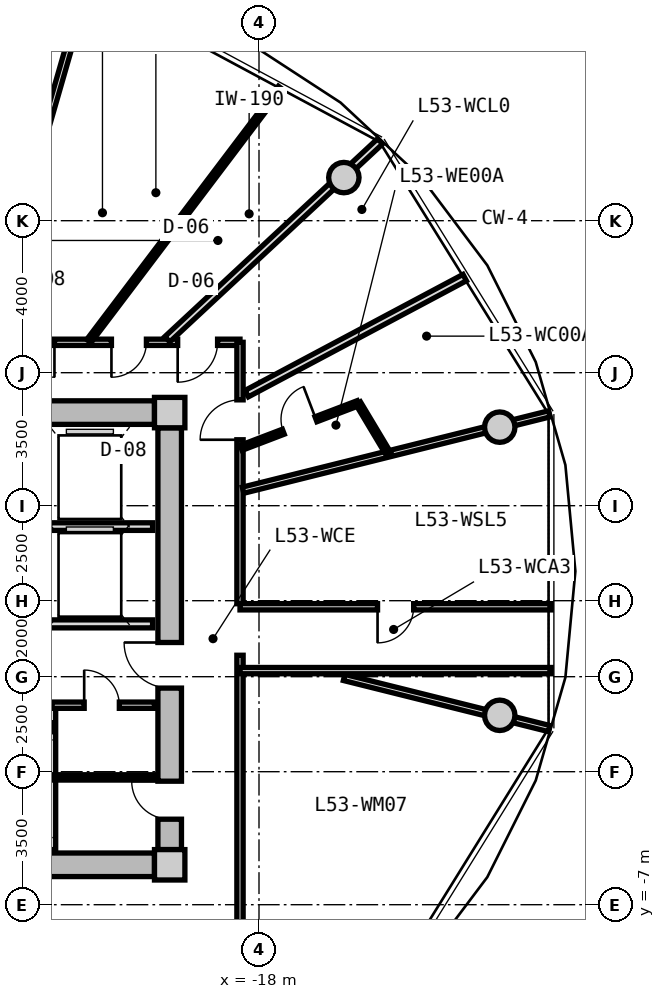
"""IFC4 building model, lengths in metres.
Left out: names, types, materials, properties, quantities, classifications, styles, units other than length and angle.
Written with IfcOpenShell. Run it as: python <this file> out.ifc"""

import sys

from ifc_helpers import new_model, si_unit, direction, frame, frame_2d, origin, origin_2d, place, context, subcontext, project, spatial, rectangle, circle, extrude, source, transform, mapped, element, fill, save


model = new_model("IFC4")
c1 = context("Model", 3, precision=1e-05, world=origin(), true_north=direction((0.0, 1.0)))
c2 = subcontext(c1, "Body", "Model", "MODEL_VIEW")
j1 = project(units=[si_unit("LENGTHUNIT", "METRE"), si_unit("PLANEANGLEUNIT", "RADIAN")], contexts=[c1])
p1 = place(None, origin())
s1 = spatial("IfcSite", under=j1, at=p1, CompositionType="ELEMENT")
p2 = place(p1, origin())
s2 = spatial("IfcBuilding", under=s1, at=p2, CompositionType="ELEMENT")
p3 = place(p2, frame((0.0, 0.0, 170.9)))
s3 = spatial("IfcBuildingStorey", under=s2, at=p3, CompositionType="ELEMENT", Elevation=170.9)
m1 = source(origin(), c2, "Body", "SweptSolid", [
    extrude(rectangle(XDim=0.8, YDim=0.8, at=origin_2d()), origin(), (0.0, 0.0, 1.0), 3.05),
])
for number, where, z_axis, x_axis in (
    (1, (-20.35, -5.95, 0.0), (0.0, 0.0, 1.0), (1.0, 0.0, 0.0)),
    (2, (-20.35, 5.95, 0.0), (0.0, 0.0, 1.0), (1.0, 0.0, 0.0)),
):
    element("IfcColumn", number, at=place(p3, frame(where, z_axis=z_axis, x_axis=x_axis)), inside=s3, PredefinedType="COLUMN", context=c2, shape_type="MappedRepresentation", body=[
        mapped(m1, transform((0.0, 0.0, 0.0), x_axis=(1.0, 0.0, 0.0), y_axis=(0.0, 1.0, 0.0), z_axis=(0.0, 0.0, 1.0), scale=1.0)),
    ])
m2 = source(origin(), c2, "Body", "SweptSolid", [
    extrude(rectangle(XDim=14.5, YDim=0.62, at=frame_2d((7.25, 0.0))), origin(), (0.0, 0.0, 1.0), 2.81),
])
for number, where, z_axis, x_axis in (
    (3, (-35.25, 5.95, 0.0), (0.0, 0.0, 1.0), (1.0, 0.0, 0.0)),
    (4, (-20.75, -5.95, 0.0), (0.0, 0.0, 1.0), (-1.0, 0.0, 0.0)),
):
    element("IfcWall", number, at=place(p3, frame(where, z_axis=z_axis, x_axis=x_axis)), inside=s3, PredefinedType="SHEAR", context=c2, shape_type="MappedRepresentation", body=[
        mapped(m2, transform((0.0, 0.0, 0.0), x_axis=(1.0, 0.0, 0.0), y_axis=(0.0, 1.0, 0.0), z_axis=(0.0, 0.0, 1.0), scale=1.0)),
    ])
m3 = source(origin(), c2, "Body", "SweptSolid", [
    extrude(rectangle(XDim=11.1, YDim=0.62, at=frame_2d((5.55, 0.0))), origin(), (0.0, 0.0, 1.0), 2.81),
])
p4 = place(p3, frame((-20.35, 5.55, 0.0), z_axis=(0.0, 0.0, 1.0), x_axis=(0.0, -1.0, 0.0)))
e5 = element("IfcWall", 5, at=p4, inside=s3, PredefinedType="SHEAR", context=c2, shape_type="MappedRepresentation", body=[
    mapped(m3, transform((0.0, 0.0, 0.0), x_axis=(1.0, 0.0, 0.0), y_axis=(0.0, 1.0, 0.0), z_axis=(0.0, 0.0, 1.0), scale=1.0)),
])
p5 = place(p4, frame((5.65, 0.0, 0.0)))
e6 = element("IfcOpeningElement", 6, at=p5, cuts=e5, PredefinedType="OPENING", context=c2, shape_type="SweptSolid", body=[
    extrude(rectangle(XDim=1.2, YDim=2.15, at=frame_2d((0.6, 1.075))), frame((0.0, 0.32, 0.0), z_axis=(0.0, -1.0, 0.0), x_axis=(1.0, 0.0, 0.0)), (0.0, 0.0, 1.0), 0.64),
])
p6 = place(p4, frame((9.3, 0.0, 0.0)))
e7 = element("IfcOpeningElement", 7, at=p6, cuts=e5, PredefinedType="OPENING", context=c2, shape_type="SweptSolid", body=[
    extrude(rectangle(XDim=1.0, YDim=2.1, at=frame_2d((0.5, 1.05))), frame((0.0, 0.32, 0.0), z_axis=(0.0, -1.0, 0.0), x_axis=(1.0, 0.0, 0.0)), (0.0, 0.0, 1.0), 0.64),
])
m4 = source(origin(), c2, "Body", "SweptSolid", [
    extrude(circle(Radius=0.4, at=origin_2d()), origin(), (0.0, 0.0, 1.0), 3.05),
])
for number, where, z_axis, x_axis in (
    (8, (-11.665, 5.567, 0.0), (0.0, 0.0, 1.0), (1.0, 0.0, 0.0)),
    (9, (-15.767, 12.135, 0.0), (0.0, 0.0, 1.0), (1.0, 0.0, 0.0)),
    (10, (-11.665, -2.016, 0.0), (0.0, 0.0, 1.0), (1.0, 0.0, 0.0)),
):
    element("IfcColumn", number, at=place(p3, frame(where, z_axis=z_axis, x_axis=x_axis)), inside=s3, PredefinedType="COLUMN", context=c2, shape_type="MappedRepresentation", body=[
        mapped(m4, transform((0.0, 0.0, 0.0), x_axis=(1.0, 0.0, 0.0), y_axis=(0.0, 1.0, 0.0), z_axis=(0.0, 0.0, 1.0), scale=1.0)),
    ])
m5 = source(origin(), c2, "Body", "SweptSolid", [
    extrude(rectangle(XDim=3.2, YDim=0.2, at=frame_2d((1.6, 0.0))), origin(), (0.0, 0.0, 1.0), 2.795),
])
p7 = place(p3, frame((-24.0, 2.95, 0.0), z_axis=(0.0, 0.0, 1.0), x_axis=(1.0, 0.0, 0.0)))
e11 = element("IfcWall", 11, at=p7, inside=s3, PredefinedType="PARTITIONING", context=c2, shape_type="MappedRepresentation", body=[
    mapped(m5, transform((0.0, 0.0, 0.0), x_axis=(1.0, 0.0, 0.0), y_axis=(0.0, 1.0, 0.0), z_axis=(0.0, 0.0, 1.0), scale=1.0)),
])
m6 = source(origin(), c2, "Body", "SweptSolid", [
    extrude(rectangle(XDim=6.66, YDim=0.21, at=frame_2d((3.33, 0.0))), origin(), (0.0, 0.0, 1.0), 2.795),
])
p8 = place(p3, frame((-27.46, 0.39, 0.0), z_axis=(0.0, 0.0, 1.0), x_axis=(1.0, 0.0, 0.0)))
e12 = element("IfcWall", 12, at=p8, inside=s3, PredefinedType="PARTITIONING", context=c2, shape_type="MappedRepresentation", body=[
    mapped(m6, transform((0.0, 0.0, 0.0), x_axis=(1.0, 0.0, 0.0), y_axis=(0.0, 1.0, 0.0), z_axis=(0.0, 0.0, 1.0), scale=1.0)),
])
p9 = place(p8, frame((1.0, 0.0, 0.0)))
e13 = element("IfcOpeningElement", 13, at=p9, cuts=e12, PredefinedType="OPENING", context=c2, shape_type="SweptSolid", body=[
    extrude(rectangle(XDim=1.2, YDim=2.15, at=frame_2d((0.6, 1.075))), frame((0.0, 0.115, 0.0), z_axis=(0.0, -1.0, 0.0), x_axis=(1.0, 0.0, 0.0)), (0.0, 0.0, 1.0), 0.23),
])
m7 = source(origin(), c2, "Body", "SweptSolid", [
    extrude(rectangle(XDim=3.8, YDim=0.2, at=frame_2d((1.9, 0.0))), origin(), (0.0, 0.0, 1.0), 2.795),
])
p10 = place(p3, frame((-23.45, -5.55, 0.0), z_axis=(0.0, 0.0, 1.0), x_axis=(0.0, 1.0, 0.0)))
e14 = element("IfcWall", 14, at=p10, inside=s3, PredefinedType="PARTITIONING", context=c2, shape_type="MappedRepresentation", body=[
    mapped(m7, transform((0.0, 0.0, 0.0), x_axis=(1.0, 0.0, 0.0), y_axis=(0.0, 1.0, 0.0), z_axis=(0.0, 0.0, 1.0), scale=1.0)),
])
m8 = source(origin(), c2, "Body", "SweptSolid", [
    extrude(rectangle(XDim=2.7, YDim=0.165, at=frame_2d((1.35, 0.0))), origin(), (0.0, 0.0, 1.0), 2.795),
])
p11 = place(p3, frame((-23.45, -1.75, 0.0), z_axis=(0.0, 0.0, 1.0), x_axis=(1.0, 0.0, 0.0)))
e15 = element("IfcWall", 15, at=p11, inside=s3, PredefinedType="PARTITIONING", context=c2, shape_type="MappedRepresentation", body=[
    mapped(m8, transform((0.0, 0.0, 0.0), x_axis=(1.0, 0.0, 0.0), y_axis=(0.0, 1.0, 0.0), z_axis=(0.0, 0.0, 1.0), scale=1.0)),
])
p12 = place(p11, frame((0.85, 0.0, 0.0)))
e16 = element("IfcOpeningElement", 16, at=p12, cuts=e15, PredefinedType="OPENING", context=c2, shape_type="SweptSolid", body=[
    extrude(rectangle(XDim=0.925, YDim=2.1, at=frame_2d((0.462, 1.05))), frame((0.0, 0.093, 0.0), z_axis=(0.0, -1.0, 0.0), x_axis=(1.0, 0.0, 0.0)), (0.0, 0.0, 1.0), 0.185),
])
m9 = source(origin(), c2, "Body", "SweptSolid", [
    extrude(rectangle(XDim=2.7, YDim=0.14, at=frame_2d((1.35, 0.0))), origin(), (0.0, 0.0, 1.0), 2.795),
])
p13 = place(p3, frame((-23.45, -3.65, 0.0), z_axis=(0.0, 0.0, 1.0), x_axis=(1.0, 0.0, 0.0)))
e17 = element("IfcWall", 17, at=p13, inside=s3, PredefinedType="PARTITIONING", context=c2, shape_type="MappedRepresentation", body=[
    mapped(m9, transform((0.0, 0.0, 0.0), x_axis=(1.0, 0.0, 0.0), y_axis=(0.0, 1.0, 0.0), z_axis=(0.0, 0.0, 1.0), scale=1.0)),
])
m10 = source(origin(), c2, "Body", "SweptSolid", [
    extrude(rectangle(XDim=8.58, YDim=0.165, at=frame_2d((4.29, 0.0))), origin(), (0.0, 0.0, 1.0), 2.795),
])
p14 = place(p3, frame((-27.08, 7.8, 0.0), z_axis=(0.0, 0.0, 1.0), x_axis=(1.0, 0.0, 0.0)))
e18 = element("IfcWall", 18, at=p14, inside=s3, PredefinedType="PARTITIONING", context=c2, shape_type="MappedRepresentation", body=[
    mapped(m10, transform((0.0, 0.0, 0.0), x_axis=(1.0, 0.0, 0.0), y_axis=(0.0, 1.0, 0.0), z_axis=(0.0, 0.0, 1.0), scale=1.0)),
])
p15 = place(p14, frame((6.94, 0.0, 0.0)))
e19 = element("IfcOpeningElement", 19, at=p15, cuts=e18, PredefinedType="OPENING", context=c2, shape_type="SweptSolid", body=[
    extrude(rectangle(XDim=1.05, YDim=2.15, at=frame_2d((0.525, 1.075))), frame((0.0, 0.093, 0.0), z_axis=(0.0, -1.0, 0.0), x_axis=(1.0, 0.0, 0.0)), (0.0, 0.0, 1.0), 0.185),
])
p16 = place(p14, frame((5.197, 0.0, 0.0)))
e20 = element("IfcOpeningElement", 20, at=p16, cuts=e18, PredefinedType="OPENING", context=c2, shape_type="SweptSolid", body=[
    extrude(rectangle(XDim=0.92, YDim=2.1, at=frame_2d((0.46, 1.05))), frame((0.0, 0.093, 0.0), z_axis=(0.0, -1.0, 0.0), x_axis=(1.0, 0.0, 0.0)), (0.0, 0.0, 1.0), 0.185),
])
p17 = place(p14, frame((2.778, 0.0, 0.0)))
e21 = element("IfcOpeningElement", 21, at=p17, cuts=e18, PredefinedType="OPENING", context=c2, shape_type="SweptSolid", body=[
    extrude(rectangle(XDim=0.92, YDim=2.1, at=frame_2d((0.46, 1.05))), frame((0.0, 0.093, 0.0), z_axis=(0.0, -1.0, 0.0), x_axis=(1.0, 0.0, 0.0)), (0.0, 0.0, 1.0), 0.185),
])
m11 = source(origin(), c2, "Body", "SweptSolid", [
    extrude(rectangle(XDim=6.88, YDim=0.165, at=frame_2d((3.44, 0.0))), origin(), (0.0, 0.0, 1.0), 2.795),
])
p18 = place(p3, frame((-18.5, 7.8, 0.0), z_axis=(0.0, 0.0, 1.0), x_axis=(0.0, -1.0, 0.0)))
e22 = element("IfcWall", 22, at=p18, inside=s3, PredefinedType="PARTITIONING", context=c2, shape_type="MappedRepresentation", body=[
    mapped(m11, transform((0.0, 0.0, 0.0), x_axis=(1.0, 0.0, 0.0), y_axis=(0.0, 1.0, 0.0), z_axis=(0.0, 0.0, 1.0), scale=1.0)),
])
p19 = place(p18, frame((1.515, 0.0, 0.0)))
e23 = element("IfcOpeningElement", 23, at=p19, cuts=e22, PredefinedType="OPENING", context=c2, shape_type="SweptSolid", body=[
    extrude(rectangle(XDim=1.05, YDim=2.15, at=frame_2d((0.525, 1.075))), frame((0.0, 0.093, 0.0), z_axis=(0.0, -1.0, 0.0), x_axis=(1.0, 0.0, 0.0)), (0.0, 0.0, 1.0), 0.185),
])
m12 = source(origin(), c2, "Body", "SweptSolid", [
    extrude(rectangle(XDim=7.365, YDim=0.165, at=frame_2d((3.682, 0.0))), origin(), (0.0, 0.0, 1.0), 2.795),
])
p20 = place(p3, frame((-18.5, -0.436, 0.0), z_axis=(0.0, 0.0, 1.0), x_axis=(0.0, -1.0, 0.0)))
e24 = element("IfcWall", 24, at=p20, inside=s3, PredefinedType="PARTITIONING", context=c2, shape_type="MappedRepresentation", body=[
    mapped(m12, transform((0.0, 0.0, 0.0), x_axis=(1.0, 0.0, 0.0), y_axis=(0.0, 1.0, 0.0), z_axis=(0.0, 0.0, 1.0), scale=1.0)),
])
m13 = source(origin(), c2, "Body", "SweptSolid", [
    extrude(rectangle(XDim=9.73, YDim=0.165, at=frame_2d((4.865, 0.0))), origin(), (0.0, 0.0, 1.0), 2.345),
])
p21 = place(p3, frame((-25.217, 7.88, 0.0), z_axis=(0.0, 0.0, 1.0), x_axis=(0.27679492614, 0.960929013436, 0.0)))
e25 = element("IfcWall", 25, at=p21, inside=s3, PredefinedType="PARTITIONING", context=c2, shape_type="MappedRepresentation", body=[
    mapped(m13, transform((0.0, 0.0, 0.0), x_axis=(1.0, 0.0, 0.0), y_axis=(0.0, 1.0, 0.0), z_axis=(0.0, 0.0, 1.0), scale=1.0)),
])
m14 = source(origin(), c2, "Body", "SweptSolid", [
    extrude(rectangle(XDim=5.564, YDim=0.165, at=frame_2d((2.782, 0.0))), origin(), (0.0, 0.0, 1.0), 2.345),
])
p22 = place(p3, frame((-15.76, -1.02, 0.0), z_axis=(0.0, 0.0, 1.0), x_axis=(0.970315176167, -0.241843872984, 0.0)))
e26 = element("IfcWall", 26, at=p22, inside=s3, PredefinedType="PARTITIONING", context=c2, shape_type="MappedRepresentation", body=[
    mapped(m14, transform((0.0, 0.0, 0.0), x_axis=(1.0, 0.0, 0.0), y_axis=(0.0, 1.0, 0.0), z_axis=(0.0, 0.0, 1.0), scale=1.0)),
])
m15 = source(origin(), c2, "Body", "SweptSolid", [
    extrude(rectangle(XDim=8.305, YDim=0.165, at=frame_2d((4.153, 0.0))), origin(), (0.0, 0.0, 1.0), 2.345),
])
p23 = place(p3, frame((-18.42, 3.908, 0.0), z_axis=(0.0, 0.0, 1.0), x_axis=(0.970309994378, 0.241864662175, 0.0)))
e27 = element("IfcWall", 27, at=p23, inside=s3, PredefinedType="PARTITIONING", context=c2, shape_type="MappedRepresentation", body=[
    mapped(m15, transform((0.0, 0.0, 0.0), x_axis=(1.0, 0.0, 0.0), y_axis=(0.0, 1.0, 0.0), z_axis=(0.0, 0.0, 1.0), scale=1.0)),
])
m16 = source(origin(), c2, "Body", "SweptSolid", [
    extrude(rectangle(XDim=8.189, YDim=0.165, at=frame_2d((4.094, 0.0))), origin(), (0.0, 0.0, 1.0), 2.795),
])
p24 = place(p3, frame((-18.5, 0.84, 0.0), z_axis=(0.0, 0.0, 1.0), x_axis=(1.0, 0.0, 0.0)))
e28 = element("IfcWall", 28, at=p24, inside=s3, PredefinedType="PARTITIONING", context=c2, shape_type="MappedRepresentation", body=[
    mapped(m16, transform((0.0, 0.0, 0.0), x_axis=(1.0, 0.0, 0.0), y_axis=(0.0, 1.0, 0.0), z_axis=(0.0, 0.0, 1.0), scale=1.0)),
])
p25 = place(p24, frame((3.619, 0.0, 0.0)))
e29 = element("IfcOpeningElement", 29, at=p25, cuts=e28, PredefinedType="OPENING", context=c2, shape_type="SweptSolid", body=[
    extrude(rectangle(XDim=0.95, YDim=2.1, at=frame_2d((0.475, 1.05))), frame((0.0, 0.093, 0.0), z_axis=(0.0, -1.0, 0.0), x_axis=(1.0, 0.0, 0.0)), (0.0, 0.0, 1.0), 0.185),
])
p26 = place(p3, frame((-10.311, -0.84, 0.0), z_axis=(0.0, 0.0, 1.0), x_axis=(-1.0, 0.0, 0.0)))
e30 = element("IfcWall", 30, at=p26, inside=s3, PredefinedType="PARTITIONING", context=c2, shape_type="MappedRepresentation", body=[
    mapped(m16, transform((0.0, 0.0, 0.0), x_axis=(1.0, 0.0, 0.0), y_axis=(0.0, 1.0, 0.0), z_axis=(0.0, 0.0, 1.0), scale=1.0)),
])
m17 = source(origin(), c2, "Body", "SweptSolid", [
    extrude(rectangle(XDim=7.648, YDim=0.19, at=frame_2d((3.824, 0.0))), origin(), (0.0, 0.0, 1.0), 2.345),
])
p27 = place(p3, frame((-20.413, 7.88, 0.0), z_axis=(0.0, 0.0, 1.0), x_axis=(0.732182665826, 0.681108320213, 0.0)))
e31 = element("IfcWall", 31, at=p27, inside=s3, PredefinedType="PARTITIONING", context=c2, shape_type="MappedRepresentation", body=[
    mapped(m17, transform((0.0, 0.0, 0.0), x_axis=(1.0, 0.0, 0.0), y_axis=(0.0, 1.0, 0.0), z_axis=(0.0, 0.0, 1.0), scale=1.0)),
])
m18 = source(origin(), c2, "Body", "SweptSolid", [
    extrude(rectangle(XDim=6.499, YDim=0.19, at=frame_2d((3.25, 0.0))), origin(), (0.0, 0.0, 1.0), 2.795),
])
p28 = place(p3, frame((-18.324, 6.449, 0.0), z_axis=(0.0, 0.0, 1.0), x_axis=(0.882715595921, 0.469907625729, 0.0)))
e32 = element("IfcWall", 32, at=p28, inside=s3, PredefinedType="PARTITIONING", context=c2, shape_type="MappedRepresentation", body=[
    mapped(m18, transform((0.0, 0.0, 0.0), x_axis=(1.0, 0.0, 0.0), y_axis=(0.0, 1.0, 0.0), z_axis=(0.0, 0.0, 1.0), scale=1.0)),
])
m19 = source(origin(), c2, "Body", "SweptSolid", [
    extrude(rectangle(XDim=3.295, YDim=0.14, at=frame_2d((1.647, 0.0))), origin(), (0.0, 0.0, 1.0), 2.795),
])
p29 = place(p3, frame((-18.47, 5.023, 0.0), z_axis=(0.0, 0.0, 1.0), x_axis=(0.934202224769, 0.356743890258, 0.0)))
e33 = element("IfcWall", 33, at=p29, inside=s3, PredefinedType="PARTITIONING", context=c2, shape_type="MappedRepresentation", body=[
    mapped(m19, transform((0.0, 0.0, 0.0), x_axis=(1.0, 0.0, 0.0), y_axis=(0.0, 1.0, 0.0), z_axis=(0.0, 0.0, 1.0), scale=1.0)),
])
p30 = place(p29, frame((1.188, 0.0, 0.0)))
e34 = element("IfcOpeningElement", 34, at=p30, cuts=e33, PredefinedType="OPENING", context=c2, shape_type="SweptSolid", body=[
    extrude(rectangle(XDim=0.92, YDim=2.1, at=frame_2d((0.46, 1.05))), frame((0.0, 0.08, 0.0), z_axis=(0.0, -1.0, 0.0), x_axis=(1.0, 0.0, 0.0)), (0.0, 0.0, 1.0), 0.16),
])
m20 = source(origin(), c2, "Body", "SweptSolid", [
    extrude(rectangle(XDim=1.558, YDim=0.14, at=frame_2d((0.779, 0.0))), origin(), (0.0, 0.0, 1.0), 2.795),
])
p31 = place(p3, frame((-15.392, 6.198, 0.0), z_axis=(0.0, 0.0, 1.0), x_axis=(0.513735221728, -0.85794878749, 0.0)))
e35 = element("IfcWall", 35, at=p31, inside=s3, PredefinedType="PARTITIONING", context=c2, shape_type="MappedRepresentation", body=[
    mapped(m20, transform((0.0, 0.0, 0.0), x_axis=(1.0, 0.0, 0.0), y_axis=(0.0, 1.0, 0.0), z_axis=(0.0, 0.0, 1.0), scale=1.0)),
])
m21 = source(origin(), c2, "Body", "SweptSolid", [
    extrude(rectangle(XDim=8.359, YDim=0.14, at=frame_2d((4.18, 0.0))), origin(), (0.0, 0.0, 1.0), 2.795),
])
p32 = place(p3, frame((-22.477, 7.83, 0.0), z_axis=(0.0, 0.0, 1.0), x_axis=(0.603265985309, 0.797540062297, 0.0)))
e36 = element("IfcWall", 36, at=p32, inside=s3, PredefinedType="PARTITIONING", context=c2, shape_type="MappedRepresentation", body=[
    mapped(m21, transform((0.0, 0.0, 0.0), x_axis=(1.0, 0.0, 0.0), y_axis=(0.0, 1.0, 0.0), z_axis=(0.0, 0.0, 1.0), scale=1.0)),
])
m22 = source(origin(), c2, "Body", "SweptSolid", [
    extrude(rectangle(XDim=1.2, YDim=2.15, at=frame_2d((0.6, 1.075))), frame((0.0, 0.025, 0.0), z_axis=(0.0, -1.0, 0.0), x_axis=(1.0, 0.0, 0.0)), (0.0, 0.0, 1.0), 0.05),
])
p33 = place(p5, frame((1.2, 0.0, 0.0), z_axis=(0.0, 0.0, 1.0), x_axis=(-1.0, 0.0, 0.0)))
e37 = element("IfcDoor", 37, at=p33, inside=s3, OperationType="SINGLE_SWING_RIGHT", PredefinedType="DOOR", context=c2, shape_type="MappedRepresentation", body=[
    mapped(m22, transform((0.0, 0.0, 0.0), x_axis=(1.0, 0.0, 0.0), y_axis=(0.0, 1.0, 0.0), z_axis=(0.0, 0.0, 1.0), scale=1.0)),
])
fill(e6, e37)
m23 = source(origin(), c2, "Body", "SweptSolid", [
    extrude(rectangle(XDim=0.925, YDim=2.1, at=frame_2d((0.462, 1.05))), frame((0.0, 0.025, 0.0), z_axis=(0.0, -1.0, 0.0), x_axis=(1.0, 0.0, 0.0)), (0.0, 0.0, 1.0), 0.05),
])
p34 = place(p12, origin())
e38 = element("IfcDoor", 38, at=p34, inside=s3, OperationType="SINGLE_SWING_LEFT", PredefinedType="DOOR", context=c2, shape_type="MappedRepresentation", body=[
    mapped(m23, transform((0.0, 0.0, 0.0), x_axis=(1.0, 0.0, 0.0), y_axis=(0.0, 1.0, 0.0), z_axis=(0.0, 0.0, 1.0), scale=1.0)),
])
fill(e16, e38)
m24 = source(origin(), c2, "Body", "SweptSolid", [
    extrude(rectangle(XDim=1.0, YDim=2.1, at=frame_2d((0.5, 1.05))), frame((0.0, 0.025, 0.0), z_axis=(0.0, -1.0, 0.0), x_axis=(1.0, 0.0, 0.0)), (0.0, 0.0, 1.0), 0.05),
])
p35 = place(p6, frame((1.0, 0.0, 0.0), z_axis=(0.0, 0.0, 1.0), x_axis=(-1.0, 0.0, 0.0)))
e39 = element("IfcDoor", 39, at=p35, inside=s3, OperationType="SINGLE_SWING_RIGHT", PredefinedType="DOOR", context=c2, shape_type="MappedRepresentation", body=[
    mapped(m24, transform((0.0, 0.0, 0.0), x_axis=(1.0, 0.0, 0.0), y_axis=(0.0, 1.0, 0.0), z_axis=(0.0, 0.0, 1.0), scale=1.0)),
])
fill(e7, e39)
m25 = source(origin(), c2, "Body", "SweptSolid", [
    extrude(rectangle(XDim=0.95, YDim=2.1, at=frame_2d((0.475, 1.05))), frame((0.0, 0.025, 0.0), z_axis=(0.0, -1.0, 0.0), x_axis=(1.0, 0.0, 0.0)), (0.0, 0.0, 1.0), 0.05),
])
p36 = place(p25, frame((0.95, 0.0, 0.0), z_axis=(0.0, 0.0, 1.0), x_axis=(-1.0, 0.0, 0.0)))
e40 = element("IfcDoor", 40, at=p36, inside=s3, OperationType="SINGLE_SWING_RIGHT", PredefinedType="DOOR", context=c2, shape_type="MappedRepresentation", body=[
    mapped(m25, transform((0.0, 0.0, 0.0), x_axis=(1.0, 0.0, 0.0), y_axis=(0.0, 1.0, 0.0), z_axis=(0.0, 0.0, 1.0), scale=1.0)),
])
fill(e29, e40)
m26 = source(origin(), c2, "Body", "SweptSolid", [
    extrude(rectangle(XDim=1.05, YDim=2.15, at=frame_2d((0.525, 1.075))), frame((0.0, 0.025, 0.0), z_axis=(0.0, -1.0, 0.0), x_axis=(1.0, 0.0, 0.0)), (0.0, 0.0, 1.0), 0.05),
])
p37 = place(p19, frame((1.05, 0.0, 0.0), z_axis=(0.0, 0.0, 1.0), x_axis=(-1.0, 0.0, 0.0)))
e41 = element("IfcDoor", 41, at=p37, inside=s3, OperationType="SINGLE_SWING_LEFT", PredefinedType="DOOR", context=c2, shape_type="MappedRepresentation", body=[
    mapped(m26, transform((0.0, 0.0, 0.0), x_axis=(1.0, 0.0, 0.0), y_axis=(0.0, 1.0, 0.0), z_axis=(0.0, 0.0, 1.0), scale=1.0)),
])
fill(e23, e41)
m27 = source(origin(), c2, "Body", "SweptSolid", [
    extrude(rectangle(XDim=0.92, YDim=2.1, at=frame_2d((0.46, 1.05))), frame((0.0, 0.025, 0.0), z_axis=(0.0, -1.0, 0.0), x_axis=(1.0, 0.0, 0.0)), (0.0, 0.0, 1.0), 0.05),
])
p38 = place(p30, origin())
e42 = element("IfcDoor", 42, at=p38, inside=s3, OperationType="SINGLE_SWING_RIGHT", PredefinedType="DOOR", context=c2, shape_type="MappedRepresentation", body=[
    mapped(m27, transform((0.0, 0.0, 0.0), x_axis=(1.0, 0.0, 0.0), y_axis=(0.0, 1.0, 0.0), z_axis=(0.0, 0.0, 1.0), scale=1.0)),
])
fill(e34, e42)
p39 = place(p15, frame((1.05, 0.0, 0.0), z_axis=(0.0, 0.0, 1.0), x_axis=(-1.0, 0.0, 0.0)))
e43 = element("IfcDoor", 43, at=p39, inside=s3, OperationType="SINGLE_SWING_RIGHT", PredefinedType="DOOR", context=c2, shape_type="MappedRepresentation", body=[
    mapped(m26, transform((0.0, 0.0, 0.0), x_axis=(1.0, 0.0, 0.0), y_axis=(0.0, 1.0, 0.0), z_axis=(0.0, 0.0, 1.0), scale=1.0)),
])
fill(e19, e43)
p40 = place(p16, frame((0.92, 0.0, 0.0), z_axis=(0.0, 0.0, 1.0), x_axis=(-1.0, 0.0, 0.0)))
e44 = element("IfcDoor", 44, at=p40, inside=s3, OperationType="SINGLE_SWING_RIGHT", PredefinedType="DOOR", context=c2, shape_type="MappedRepresentation", body=[
    mapped(m27, transform((0.0, 0.0, 0.0), x_axis=(1.0, 0.0, 0.0), y_axis=(0.0, 1.0, 0.0), z_axis=(0.0, 0.0, 1.0), scale=1.0)),
])
fill(e20, e44)
p41 = place(p17, frame((0.92, 0.0, 0.0), z_axis=(0.0, 0.0, 1.0), x_axis=(-1.0, 0.0, 0.0)))
e45 = element("IfcDoor", 45, at=p41, inside=s3, OperationType="SINGLE_SWING_LEFT", PredefinedType="DOOR", context=c2, shape_type="MappedRepresentation", body=[
    mapped(m27, transform((0.0, 0.0, 0.0), x_axis=(1.0, 0.0, 0.0), y_axis=(0.0, 1.0, 0.0), z_axis=(0.0, 0.0, 1.0), scale=1.0)),
])
fill(e21, e45)
save(model, sys.argv[1])
